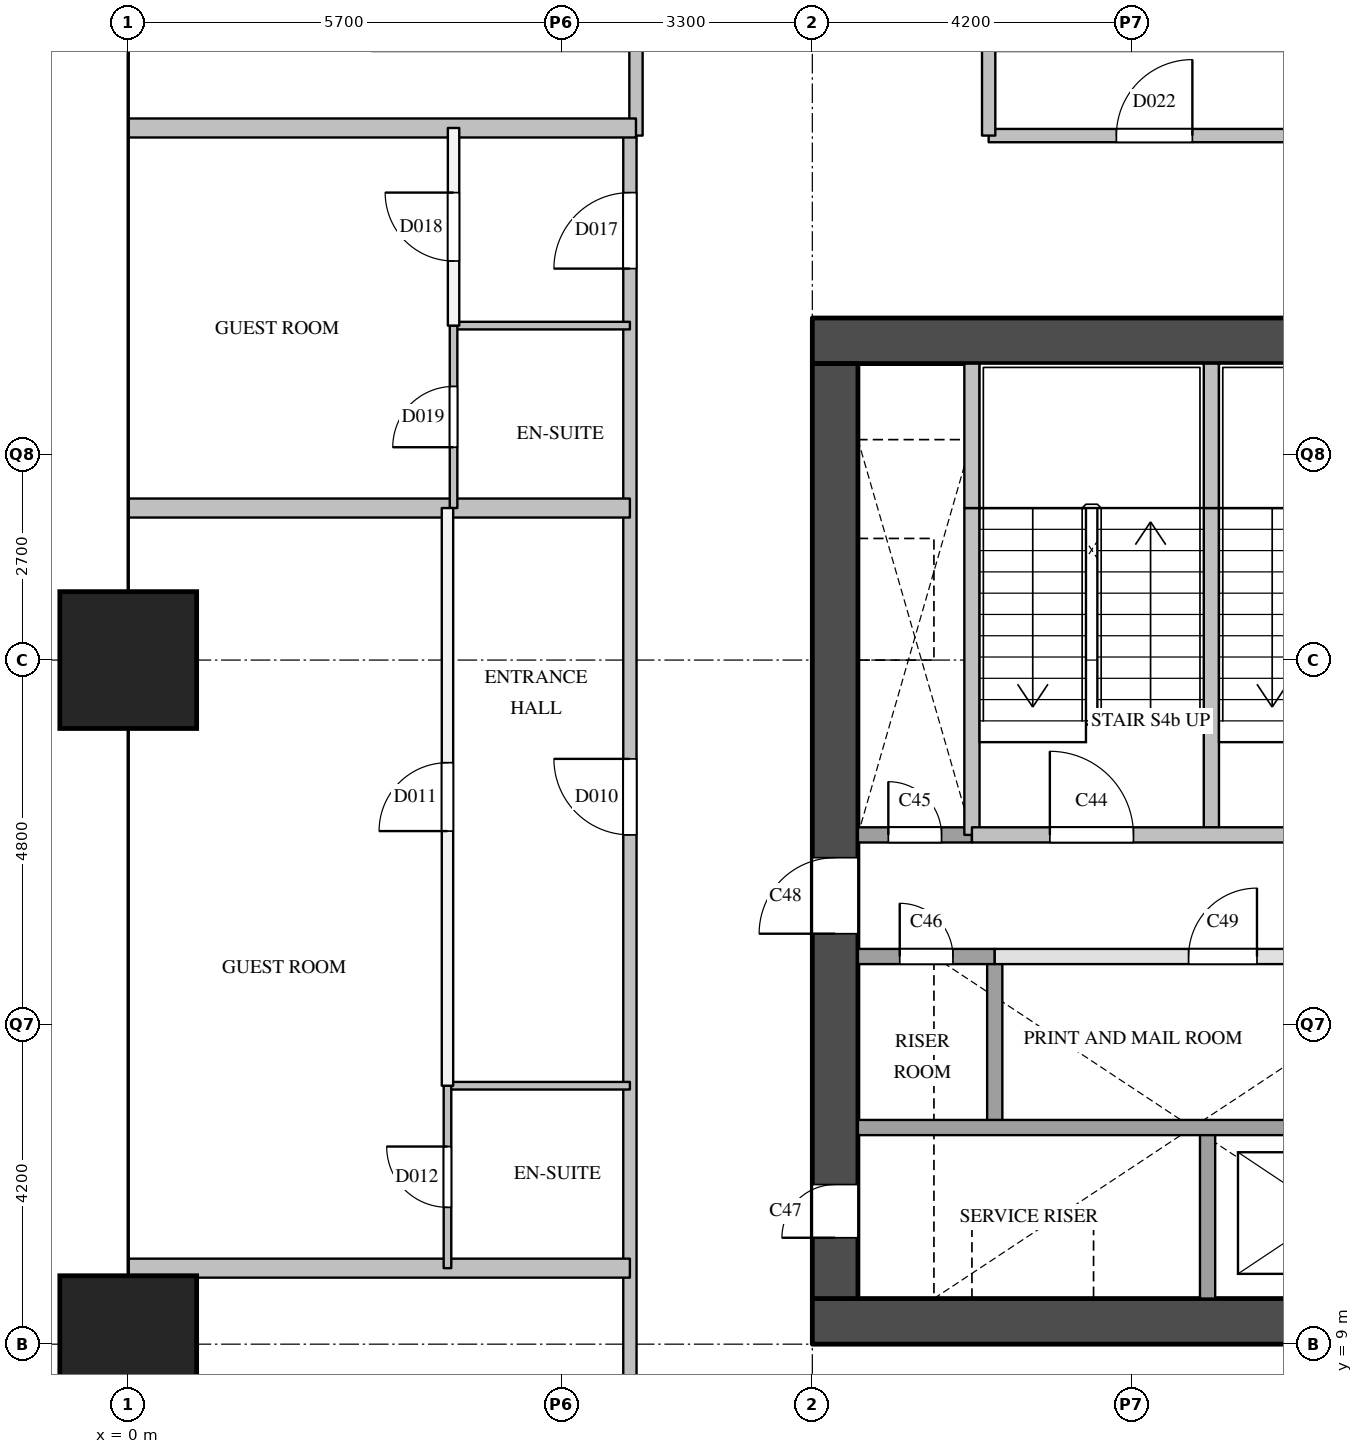
"""IFC4 building model, lengths in metres.
Left out: names, types, materials, properties, quantities, classifications, styles, units other than length and angle.
Written with IfcOpenShell. Run it as: python <this file> out.ifc"""

import sys

from ifc_helpers import new_model, si_unit, direction, frame, frame_2d, origin, origin_2d, place, context, subcontext, project, spatial, rectangle, extrude, element, fill, save


model = new_model("IFC4")
c1 = context("Model", 3, precision=1e-05, world=origin(), true_north=direction((0.0, 1.0)))
c2 = subcontext(c1, "Body", "Model", "MODEL_VIEW")
j1 = project(units=[si_unit("LENGTHUNIT", "METRE"), si_unit("PLANEANGLEUNIT", "RADIAN")], contexts=[c1])
p1 = place(None, origin())
s1 = spatial("IfcSite", under=j1, at=p1, CompositionType="ELEMENT")
p2 = place(p1, origin())
s2 = spatial("IfcBuilding", under=s1, at=p2, CompositionType="ELEMENT")
p3 = place(p2, frame((0.0, 0.0, 50.0)))
s3 = spatial("IfcBuildingStorey", under=s2, at=p3, CompositionType="ELEMENT", Elevation=50.0)
for number, where, z_axis, x_axis in (
    (1, (0.0, 9.0, 0.0), (0.0, 0.0, 1.0), (1.0, 0.0, 0.0)),
    (2, (0.0, 18.0, 0.0), (0.0, 0.0, 1.0), (1.0, 0.0, 0.0)),
):
    element("IfcColumn", number, at=place(p3, frame(where, z_axis=z_axis, x_axis=x_axis)), inside=s3, PredefinedType="COLUMN", context=c2, shape_type="SweptSolid", body=[
        extrude(rectangle(XDim=1.8, YDim=1.8, at=origin_2d()), origin(), (0.0, 0.0, 1.0), 3.8),
    ])
for number, where, z_axis, x_axis in (
    (3, (9.0, 9.3, 0.0), (0.0, 0.0, 1.0), (1.0, 0.0, 0.0)),
    (4, (9.0, 22.2, 0.0), (0.0, 0.0, 1.0), (1.0, 0.0, 0.0)),
):
    element("IfcWall", number, at=place(p3, frame(where, z_axis=z_axis, x_axis=x_axis)), inside=s3, PredefinedType="SHEAR", context=c2, shape_type="SweptSolid", body=[
        extrude(rectangle(XDim=9.0, YDim=0.6, at=frame_2d((4.5, 0.0))), origin(), (0.0, 0.0, 1.0), 3.5),
    ])
p4 = place(p3, frame((9.3, 9.6, 0.0), z_axis=(0.0, 0.0, 1.0), x_axis=(0.0, 1.0, 0.0)))
e5 = element("IfcWall", 5, at=p4, inside=s3, PredefinedType="SHEAR", context=c2, shape_type="SweptSolid", body=[
    extrude(rectangle(XDim=12.3, YDim=0.6, at=frame_2d((6.15, 0.0))), origin(), (0.0, 0.0, 1.0), 3.5),
])
p5 = place(p4, frame((0.8, 0.0, 0.0)))
e6 = element("IfcOpeningElement", 6, at=p5, cuts=e5, PredefinedType="OPENING", context=c2, shape_type="SweptSolid", body=[
    extrude(rectangle(XDim=0.7, YDim=2.1, at=frame_2d((0.35, 1.05))), frame((0.0, 0.31, 0.0), z_axis=(0.0, -1.0, 0.0), x_axis=(1.0, 0.0, 0.0)), (0.0, 0.0, 1.0), 0.62),
])
p6 = place(p4, frame((4.8, 0.0, 0.0)))
e7 = element("IfcOpeningElement", 7, at=p6, cuts=e5, PredefinedType="OPENING", context=c2, shape_type="SweptSolid", body=[
    extrude(rectangle(XDim=1.0, YDim=2.1, at=frame_2d((0.5, 1.05))), frame((0.0, 0.31, 0.0), z_axis=(0.0, -1.0, 0.0), x_axis=(1.0, 0.0, 0.0)), (0.0, 0.0, 1.0), 0.62),
])
p7 = place(p3, frame((11.1, 15.7, 0.0), z_axis=(0.0, 0.0, 1.0), x_axis=(0.0, 1.0, 0.0)))
e8 = element("IfcWall", 8, at=p7, inside=s3, PredefinedType="SOLIDWALL", context=c2, shape_type="SweptSolid", body=[
    extrude(rectangle(XDim=4.3, YDim=0.2, at=frame_2d((2.15, 0.0))), origin(), (0.0, 0.0, 1.0), 3.5),
])
p8 = place(p3, frame((11.1, 20.0, 0.0), z_axis=(0.0, 0.0, 1.0), x_axis=(0.0, 1.0, 0.0)))
e9 = element("IfcWall", 9, at=p8, inside=s3, PredefinedType="SOLIDWALL", context=c2, shape_type="SweptSolid", body=[
    extrude(rectangle(XDim=1.9, YDim=0.2, at=frame_2d((0.95, 0.0))), origin(), (0.0, 0.0, 1.0), 3.5),
])
p9 = place(p3, frame((11.4, 11.9, 0.0), z_axis=(0.0, 0.0, 1.0), x_axis=(0.0, 1.0, 0.0)))
e10 = element("IfcWall", 10, at=p9, inside=s3, PredefinedType="SOLIDWALL", context=c2, shape_type="SweptSolid", body=[
    extrude(rectangle(XDim=2.2, YDim=0.2, at=frame_2d((1.1, 0.0))), origin(), (0.0, 0.0, 1.0), 3.5),
])
p10 = place(p3, frame((14.2, 9.6, 0.0), z_axis=(0.0, 0.0, 1.0), x_axis=(0.0, 1.0, 0.0)))
e11 = element("IfcWall", 11, at=p10, inside=s3, PredefinedType="SOLIDWALL", context=c2, shape_type="SweptSolid", body=[
    extrude(rectangle(XDim=2.3, YDim=0.2, at=frame_2d((1.15, 0.0))), origin(), (0.0, 0.0, 1.0), 3.5),
])
p11 = place(p3, frame((14.25, 15.7, 0.0), z_axis=(0.0, 0.0, 1.0), x_axis=(0.0, 1.0, 0.0)))
e12 = element("IfcWall", 12, at=p11, inside=s3, PredefinedType="SOLIDWALL", context=c2, shape_type="SweptSolid", body=[
    extrude(rectangle(XDim=4.3, YDim=0.2, at=frame_2d((2.15, 0.0))), origin(), (0.0, 0.0, 1.0), 3.5),
])
p12 = place(p3, frame((14.25, 20.0, 0.0), z_axis=(0.0, 0.0, 1.0), x_axis=(0.0, 1.0, 0.0)))
e13 = element("IfcWall", 13, at=p12, inside=s3, PredefinedType="SOLIDWALL", context=c2, shape_type="SweptSolid", body=[
    extrude(rectangle(XDim=1.9, YDim=0.2, at=frame_2d((0.95, 0.0))), origin(), (0.0, 0.0, 1.0), 3.5),
])
p13 = place(p3, frame((9.6, 11.85, 0.0), z_axis=(0.0, 0.0, 1.0), x_axis=(1.0, 0.0, 0.0)))
e14 = element("IfcWall", 14, at=p13, inside=s3, PredefinedType="SOLIDWALL", context=c2, shape_type="SweptSolid", body=[
    extrude(rectangle(XDim=7.8, YDim=0.2, at=frame_2d((3.9, 0.0))), origin(), (0.0, 0.0, 1.0), 3.5),
])
p14 = place(p3, frame((11.4, 14.1, 0.0), z_axis=(0.0, 0.0, 1.0), x_axis=(1.0, 0.0, 0.0)))
e15 = element("IfcWall", 15, at=p14, inside=s3, PredefinedType="PARTITIONING", context=c2, shape_type="SweptSolid", body=[
    extrude(rectangle(XDim=6.0, YDim=0.2, at=frame_2d((3.0, 0.0))), origin(), (0.0, 0.0, 1.0), 3.5),
])
p15 = place(p14, frame((2.55, 0.0, 0.0)))
e16 = element("IfcOpeningElement", 16, at=p15, cuts=e15, PredefinedType="OPENING", context=c2, shape_type="SweptSolid", body=[
    extrude(rectangle(XDim=0.9, YDim=2.1, at=frame_2d((0.45, 1.05))), frame((0.0, 0.11, 0.0), z_axis=(0.0, -1.0, 0.0), x_axis=(1.0, 0.0, 0.0)), (0.0, 0.0, 1.0), 0.22),
])
p16 = place(p3, frame((9.6, 14.1, 0.0), z_axis=(0.0, 0.0, 1.0), x_axis=(1.0, 0.0, 0.0)))
e17 = element("IfcWall", 17, at=p16, inside=s3, PredefinedType="SOLIDWALL", context=c2, shape_type="SweptSolid", body=[
    extrude(rectangle(XDim=1.8, YDim=0.2, at=frame_2d((0.9, 0.0))), origin(), (0.0, 0.0, 1.0), 3.5),
])
p17 = place(p16, frame((0.55, 0.0, 0.0)))
e18 = element("IfcOpeningElement", 18, at=p17, cuts=e17, PredefinedType="OPENING", context=c2, shape_type="SweptSolid", body=[
    extrude(rectangle(XDim=0.7, YDim=2.1, at=frame_2d((0.35, 1.05))), frame((0.0, 0.11, 0.0), z_axis=(0.0, -1.0, 0.0), x_axis=(1.0, 0.0, 0.0)), (0.0, 0.0, 1.0), 0.22),
])
p18 = place(p3, frame((9.6, 15.7, 0.0), z_axis=(0.0, 0.0, 1.0), x_axis=(1.0, 0.0, 0.0)))
e19 = element("IfcWall", 19, at=p18, inside=s3, PredefinedType="SOLIDWALL", context=c2, shape_type="SweptSolid", body=[
    extrude(rectangle(XDim=1.5, YDim=0.2, at=frame_2d((0.75, 0.0))), origin(), (0.0, 0.0, 1.0), 3.5),
])
p19 = place(p18, frame((0.4, 0.0, 0.0)))
e20 = element("IfcOpeningElement", 20, at=p19, cuts=e19, PredefinedType="OPENING", context=c2, shape_type="SweptSolid", body=[
    extrude(rectangle(XDim=0.7, YDim=2.1, at=frame_2d((0.35, 1.05))), frame((0.0, 0.11, 0.0), z_axis=(0.0, -1.0, 0.0), x_axis=(1.0, 0.0, 0.0)), (0.0, 0.0, 1.0), 0.22),
])
p20 = place(p3, frame((11.1, 15.7, 0.0), z_axis=(0.0, 0.0, 1.0), x_axis=(1.0, 0.0, 0.0)))
e21 = element("IfcWall", 21, at=p20, inside=s3, PredefinedType="SOLIDWALL", context=c2, shape_type="SweptSolid", body=[
    extrude(rectangle(XDim=6.3, YDim=0.2, at=frame_2d((3.15, 0.0))), origin(), (0.0, 0.0, 1.0), 3.5),
])
p21 = place(p20, frame((4.175, 0.0, 0.0)))
e22 = element("IfcOpeningElement", 22, at=p21, cuts=e21, PredefinedType="OPENING", context=c2, shape_type="SweptSolid", body=[
    extrude(rectangle(XDim=1.1, YDim=2.1, at=frame_2d((0.55, 1.05))), frame((0.0, 0.11, 0.0), z_axis=(0.0, -1.0, 0.0), x_axis=(1.0, 0.0, 0.0)), (0.0, 0.0, 1.0), 0.22),
])
p22 = place(p20, frame((1.025, 0.0, 0.0)))
e23 = element("IfcOpeningElement", 23, at=p22, cuts=e21, PredefinedType="OPENING", context=c2, shape_type="SweptSolid", body=[
    extrude(rectangle(XDim=1.1, YDim=2.1, at=frame_2d((0.55, 1.05))), frame((0.0, 0.11, 0.0), z_axis=(0.0, -1.0, 0.0), x_axis=(1.0, 0.0, 0.0)), (0.0, 0.0, 1.0), 0.22),
])
p23 = place(p3, frame((6.6, 24.9, 0.0), z_axis=(0.0, 0.0, 1.0), x_axis=(1.0, 0.0, 0.0)))
e24 = element("IfcWall", 24, at=p23, inside=s3, PredefinedType="PARTITIONING", context=c2, shape_type="SweptSolid", body=[
    extrude(rectangle(XDim=0.08, YDim=0.175, at=frame_2d((0.04, 0.0))), origin(), (0.0, 0.0, 1.0), 3.5),
])
p24 = place(p3, frame((11.32, 24.9, 0.0), z_axis=(0.0, 0.0, 1.0), x_axis=(1.0, 0.0, 0.0)))
e25 = element("IfcWall", 25, at=p24, inside=s3, PredefinedType="PARTITIONING", context=c2, shape_type="SweptSolid", body=[
    extrude(rectangle(XDim=4.36, YDim=0.175, at=frame_2d((2.18, 0.0))), origin(), (0.0, 0.0, 1.0), 3.5),
])
p25 = place(p24, frame((1.68, 0.0, 0.0)))
e26 = element("IfcOpeningElement", 26, at=p25, cuts=e25, PredefinedType="OPENING", context=c2, shape_type="SweptSolid", body=[
    extrude(rectangle(XDim=1.0, YDim=2.1, at=frame_2d((0.5, 1.05))), frame((0.0, 0.097, 0.0), z_axis=(0.0, -1.0, 0.0), x_axis=(1.0, 0.0, 0.0)), (0.0, 0.0, 1.0), 0.195),
])
p26 = place(p3, frame((6.6, 6.6, 0.0), z_axis=(0.0, 0.0, 1.0), x_axis=(0.0, 1.0, 0.0)))
e27 = element("IfcWall", 27, at=p26, inside=s3, PredefinedType="PARTITIONING", context=c2, shape_type="SweptSolid", body=[
    extrude(rectangle(XDim=18.3, YDim=0.175, at=frame_2d((9.15, 0.0))), origin(), (0.0, 0.0, 1.0), 3.5),
])
p27 = place(p26, frame((9.1, 0.0, 0.0)))
e28 = element("IfcOpeningElement", 28, at=p27, cuts=e27, PredefinedType="OPENING", context=c2, shape_type="SweptSolid", body=[
    extrude(rectangle(XDim=1.0, YDim=2.1, at=frame_2d((0.5, 1.05))), frame((0.0, 0.097, 0.0), z_axis=(0.0, -1.0, 0.0), x_axis=(1.0, 0.0, 0.0)), (0.0, 0.0, 1.0), 0.195),
])
p28 = place(p26, frame((16.55, 0.0, 0.0)))
e29 = element("IfcOpeningElement", 29, at=p28, cuts=e27, PredefinedType="OPENING", context=c2, shape_type="SweptSolid", body=[
    extrude(rectangle(XDim=1.0, YDim=2.1, at=frame_2d((0.5, 1.05))), frame((0.0, 0.097, 0.0), z_axis=(0.0, -1.0, 0.0), x_axis=(1.0, 0.0, 0.0)), (0.0, 0.0, 1.0), 0.195),
])
for number, where, z_axis, x_axis in (
    (30, (6.68, 24.9, 0.0), (0.0, 0.0, 1.0), (0.0, 1.0, 0.0)),
    (31, (11.32, 24.9, 0.0), (0.0, 0.0, 1.0), (0.0, 1.0, 0.0)),
):
    element("IfcWall", number, at=place(p3, frame(where, z_axis=z_axis, x_axis=x_axis)), inside=s3, PredefinedType="PARTITIONING", context=c2, shape_type="SweptSolid", body=[
        extrude(rectangle(XDim=1.2, YDim=0.175, at=frame_2d((0.6, 0.0))), origin(), (0.0, 0.0, 1.0), 3.5),
    ])
p29 = place(p3, frame((4.2, 12.4, 0.0), z_axis=(0.0, 0.0, 1.0), x_axis=(0.0, 1.0, 0.0)))
e32 = element("IfcWall", 32, at=p29, inside=s3, PredefinedType="PARTITIONING", context=c2, shape_type="SweptSolid", body=[
    extrude(rectangle(XDim=7.6, YDim=0.15, at=frame_2d((3.8, 0.0))), origin(), (0.0, 0.0, 1.0), 3.5),
])
p30 = place(p29, frame((3.35, 0.0, 0.0)))
e33 = element("IfcOpeningElement", 33, at=p30, cuts=e32, PredefinedType="OPENING", context=c2, shape_type="SweptSolid", body=[
    extrude(rectangle(XDim=0.9, YDim=2.1, at=frame_2d((0.45, 1.05))), frame((0.0, 0.085, 0.0), z_axis=(0.0, -1.0, 0.0), x_axis=(1.0, 0.0, 0.0)), (0.0, 0.0, 1.0), 0.17),
])
p31 = place(p3, frame((4.28, 22.4, 0.0), z_axis=(0.0, 0.0, 1.0), x_axis=(0.0, 1.0, 0.0)))
e34 = element("IfcWall", 34, at=p31, inside=s3, PredefinedType="PARTITIONING", context=c2, shape_type="SweptSolid", body=[
    extrude(rectangle(XDim=2.6, YDim=0.15, at=frame_2d((1.3, 0.0))), origin(), (0.0, 0.0, 1.0), 3.5),
])
p32 = place(p31, frame((0.85, 0.0, 0.0)))
e35 = element("IfcOpeningElement", 35, at=p32, cuts=e34, PredefinedType="OPENING", context=c2, shape_type="SweptSolid", body=[
    extrude(rectangle(XDim=0.9, YDim=2.1, at=frame_2d((0.45, 1.05))), frame((0.0, 0.085, 0.0), z_axis=(0.0, -1.0, 0.0), x_axis=(1.0, 0.0, 0.0)), (0.0, 0.0, 1.0), 0.17),
])
for number, where, z_axis, x_axis in (
    (36, (0.0, 10.0, 0.0), (0.0, 0.0, 1.0), (1.0, 0.0, 0.0)),
    (37, (0.0, 20.0, 0.0), (0.0, 0.0, 1.0), (1.0, 0.0, 0.0)),
):
    element("IfcWall", number, at=place(p3, frame(where, z_axis=z_axis, x_axis=x_axis)), inside=s3, PredefinedType="PARTITIONING", context=c2, shape_type="SweptSolid", body=[
        extrude(rectangle(XDim=6.6, YDim=0.25, at=frame_2d((3.3, 0.0))), origin(), (0.0, 0.0, 1.0), 2.5),
    ])
p33 = place(p3, frame((0.0, 25.0, 0.0), z_axis=(0.0, 0.0, 1.0), x_axis=(1.0, 0.0, 0.0)))
e38 = element("IfcWall", 38, at=p33, inside=s3, PredefinedType="PARTITIONING", context=c2, shape_type="SweptSolid", body=[
    extrude(rectangle(XDim=6.68, YDim=0.25, at=frame_2d((3.34, 0.0))), origin(), (0.0, 0.0, 1.0), 2.5),
])
p34 = place(p3, frame((4.2, 12.4, 0.0), z_axis=(0.0, 0.0, 1.0), x_axis=(1.0, 0.0, 0.0)))
e39 = element("IfcWall", 39, at=p34, inside=s3, PredefinedType="PARTITIONING", context=c2, shape_type="SweptSolid", body=[
    extrude(rectangle(XDim=2.4, YDim=0.1, at=frame_2d((1.2, 0.0))), origin(), (0.0, 0.0, 1.0), 3.5),
])
p35 = place(p3, frame((4.28, 22.4, 0.0), z_axis=(0.0, 0.0, 1.0), x_axis=(1.0, 0.0, 0.0)))
e40 = element("IfcWall", 40, at=p35, inside=s3, PredefinedType="PARTITIONING", context=c2, shape_type="SweptSolid", body=[
    extrude(rectangle(XDim=2.32, YDim=0.1, at=frame_2d((1.16, 0.0))), origin(), (0.0, 0.0, 1.0), 3.5),
])
p36 = place(p3, frame((4.2, 10.0, 0.0), z_axis=(0.0, 0.0, 1.0), x_axis=(0.0, 1.0, 0.0)))
e41 = element("IfcWall", 41, at=p36, inside=s3, PredefinedType="PARTITIONING", context=c2, shape_type="SweptSolid", body=[
    extrude(rectangle(XDim=2.4, YDim=0.1, at=frame_2d((1.2, 0.0))), origin(), (0.0, 0.0, 1.0), 3.5),
])
p37 = place(p36, frame((0.8, 0.0, 0.0)))
e42 = element("IfcOpeningElement", 42, at=p37, cuts=e41, PredefinedType="OPENING", context=c2, shape_type="SweptSolid", body=[
    extrude(rectangle(XDim=0.8, YDim=2.1, at=frame_2d((0.4, 1.05))), frame((0.0, 0.06, 0.0), z_axis=(0.0, -1.0, 0.0), x_axis=(1.0, 0.0, 0.0)), (0.0, 0.0, 1.0), 0.12),
])
p38 = place(p3, frame((4.28, 20.0, 0.0), z_axis=(0.0, 0.0, 1.0), x_axis=(0.0, 1.0, 0.0)))
e43 = element("IfcWall", 43, at=p38, inside=s3, PredefinedType="PARTITIONING", context=c2, shape_type="SweptSolid", body=[
    extrude(rectangle(XDim=2.4, YDim=0.1, at=frame_2d((1.2, 0.0))), origin(), (0.0, 0.0, 1.0), 3.5),
])
p39 = place(p38, frame((0.8, 0.0, 0.0)))
e44 = element("IfcOpeningElement", 44, at=p39, cuts=e43, PredefinedType="OPENING", context=c2, shape_type="SweptSolid", body=[
    extrude(rectangle(XDim=0.8, YDim=2.1, at=frame_2d((0.4, 1.05))), frame((0.0, 0.06, 0.0), z_axis=(0.0, -1.0, 0.0), x_axis=(1.0, 0.0, 0.0)), (0.0, 0.0, 1.0), 0.12),
])
p40 = place(p22, origin())
e45 = element("IfcDoor", 45, at=p40, inside=s3, OperationType="SINGLE_SWING_LEFT", PredefinedType="DOOR", context=c2, shape_type="SweptSolid", body=[
    extrude(rectangle(XDim=1.1, YDim=2.1, at=frame_2d((0.55, 1.05))), frame((0.0, 0.025, 0.0), z_axis=(0.0, -1.0, 0.0), x_axis=(1.0, 0.0, 0.0)), (0.0, 0.0, 1.0), 0.05),
])
fill(e23, e45)
p41 = place(p19, origin())
e46 = element("IfcDoor", 46, at=p41, inside=s3, OperationType="SINGLE_SWING_LEFT", PredefinedType="DOOR", context=c2, shape_type="SweptSolid", body=[
    extrude(rectangle(XDim=0.7, YDim=2.1, at=frame_2d((0.35, 1.05))), frame((0.0, 0.025, 0.0), z_axis=(0.0, -1.0, 0.0), x_axis=(1.0, 0.0, 0.0)), (0.0, 0.0, 1.0), 0.05),
])
fill(e20, e46)
p42 = place(p17, origin())
e47 = element("IfcDoor", 47, at=p42, inside=s3, OperationType="SINGLE_SWING_LEFT", PredefinedType="DOOR", context=c2, shape_type="SweptSolid", body=[
    extrude(rectangle(XDim=0.7, YDim=2.1, at=frame_2d((0.35, 1.05))), frame((0.0, 0.025, 0.0), z_axis=(0.0, -1.0, 0.0), x_axis=(1.0, 0.0, 0.0)), (0.0, 0.0, 1.0), 0.05),
])
fill(e18, e47)
p43 = place(p5, origin())
e48 = element("IfcDoor", 48, at=p43, inside=s3, OperationType="SINGLE_SWING_LEFT", PredefinedType="DOOR", context=c2, shape_type="SweptSolid", body=[
    extrude(rectangle(XDim=0.7, YDim=2.1, at=frame_2d((0.35, 1.05))), frame((0.0, 0.025, 0.0), z_axis=(0.0, -1.0, 0.0), x_axis=(1.0, 0.0, 0.0)), (0.0, 0.0, 1.0), 0.05),
])
fill(e6, e48)
p44 = place(p6, origin())
e49 = element("IfcDoor", 49, at=p44, inside=s3, OperationType="SINGLE_SWING_LEFT", PredefinedType="DOOR", context=c2, shape_type="SweptSolid", body=[
    extrude(rectangle(XDim=1.0, YDim=2.1, at=frame_2d((0.5, 1.05))), frame((0.0, 0.025, 0.0), z_axis=(0.0, -1.0, 0.0), x_axis=(1.0, 0.0, 0.0)), (0.0, 0.0, 1.0), 0.05),
])
fill(e7, e49)
p45 = place(p15, origin())
e50 = element("IfcDoor", 50, at=p45, inside=s3, OperationType="SINGLE_SWING_RIGHT", PredefinedType="DOOR", context=c2, shape_type="SweptSolid", body=[
    extrude(rectangle(XDim=0.9, YDim=2.1, at=frame_2d((0.45, 1.05))), frame((0.0, 0.025, 0.0), z_axis=(0.0, -1.0, 0.0), x_axis=(1.0, 0.0, 0.0)), (0.0, 0.0, 1.0), 0.05),
])
fill(e16, e50)
p46 = place(p27, origin())
e51 = element("IfcDoor", 51, at=p46, inside=s3, OperationType="SINGLE_SWING_RIGHT", PredefinedType="DOOR", context=c2, shape_type="SweptSolid", body=[
    extrude(rectangle(XDim=1.0, YDim=2.1, at=frame_2d((0.5, 1.05))), frame((0.0, 0.025, 0.0), z_axis=(0.0, -1.0, 0.0), x_axis=(1.0, 0.0, 0.0)), (0.0, 0.0, 1.0), 0.05),
])
fill(e28, e51)
p47 = place(p30, origin())
e52 = element("IfcDoor", 52, at=p47, inside=s3, OperationType="SINGLE_SWING_LEFT", PredefinedType="DOOR", context=c2, shape_type="SweptSolid", body=[
    extrude(rectangle(XDim=0.9, YDim=2.1, at=frame_2d((0.45, 1.05))), frame((0.0, 0.025, 0.0), z_axis=(0.0, -1.0, 0.0), x_axis=(1.0, 0.0, 0.0)), (0.0, 0.0, 1.0), 0.05),
])
fill(e33, e52)
p48 = place(p37, origin())
e53 = element("IfcDoor", 53, at=p48, inside=s3, OperationType="SINGLE_SWING_RIGHT", PredefinedType="DOOR", context=c2, shape_type="SweptSolid", body=[
    extrude(rectangle(XDim=0.8, YDim=2.1, at=frame_2d((0.4, 1.05))), frame((0.0, 0.025, 0.0), z_axis=(0.0, -1.0, 0.0), x_axis=(1.0, 0.0, 0.0)), (0.0, 0.0, 1.0), 0.05),
])
fill(e42, e53)
p49 = place(p28, origin())
e54 = element("IfcDoor", 54, at=p49, inside=s3, OperationType="SINGLE_SWING_LEFT", PredefinedType="DOOR", context=c2, shape_type="SweptSolid", body=[
    extrude(rectangle(XDim=1.0, YDim=2.1, at=frame_2d((0.5, 1.05))), frame((0.0, 0.025, 0.0), z_axis=(0.0, -1.0, 0.0), x_axis=(1.0, 0.0, 0.0)), (0.0, 0.0, 1.0), 0.05),
])
fill(e29, e54)
p50 = place(p32, origin())
e55 = element("IfcDoor", 55, at=p50, inside=s3, OperationType="SINGLE_SWING_RIGHT", PredefinedType="DOOR", context=c2, shape_type="SweptSolid", body=[
    extrude(rectangle(XDim=0.9, YDim=2.1, at=frame_2d((0.45, 1.05))), frame((0.0, 0.025, 0.0), z_axis=(0.0, -1.0, 0.0), x_axis=(1.0, 0.0, 0.0)), (0.0, 0.0, 1.0), 0.05),
])
fill(e35, e55)
p51 = place(p39, origin())
e56 = element("IfcDoor", 56, at=p51, inside=s3, OperationType="SINGLE_SWING_LEFT", PredefinedType="DOOR", context=c2, shape_type="SweptSolid", body=[
    extrude(rectangle(XDim=0.8, YDim=2.1, at=frame_2d((0.4, 1.05))), frame((0.0, 0.025, 0.0), z_axis=(0.0, -1.0, 0.0), x_axis=(1.0, 0.0, 0.0)), (0.0, 0.0, 1.0), 0.05),
])
fill(e44, e56)
p52 = place(p25, origin())
e57 = element("IfcDoor", 57, at=p52, inside=s3, OperationType="SINGLE_SWING_RIGHT", PredefinedType="DOOR", context=c2, shape_type="SweptSolid", body=[
    extrude(rectangle(XDim=1.0, YDim=2.1, at=frame_2d((0.5, 1.05))), frame((0.0, 0.025, 0.0), z_axis=(0.0, -1.0, 0.0), x_axis=(1.0, 0.0, 0.0)), (0.0, 0.0, 1.0), 0.05),
])
fill(e26, e57)
save(model, sys.argv[1])
